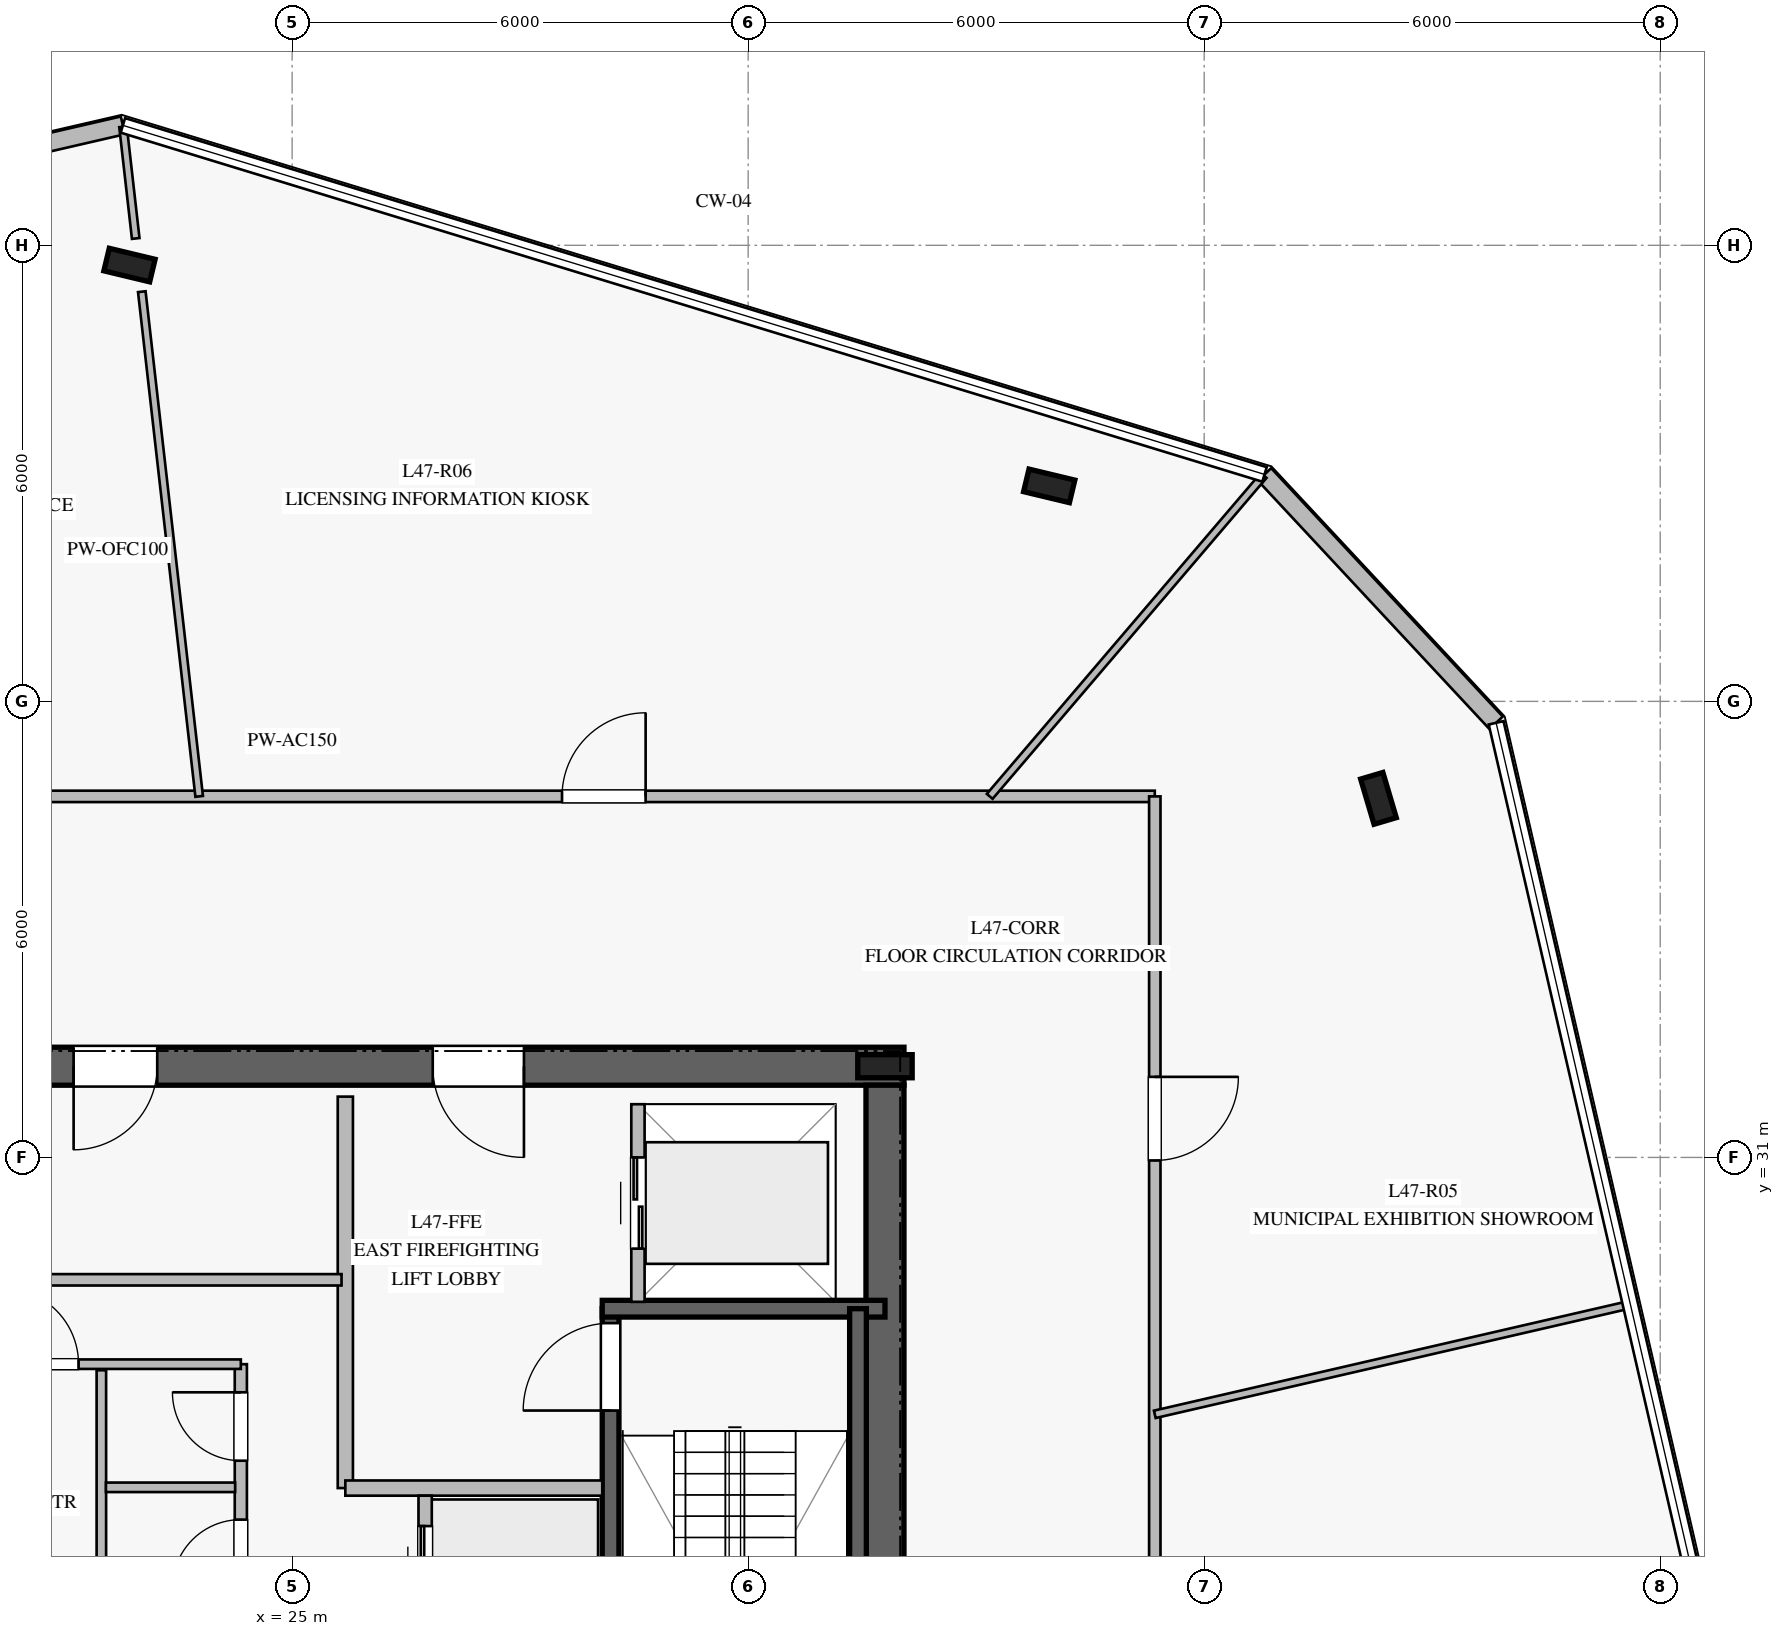
"""IFC4 building model, lengths in metres.
Left out: names, types, materials, properties, quantities, classifications, styles, units other than length and angle.
Written with IfcOpenShell. Run it as: python <this file> out.ifc"""

import sys

from ifc_helpers import new_model, si_unit, direction, frame, frame_2d, origin, origin_2d, place, context, subcontext, project, spatial, rectangle, i_section, extrude, element, fill, save


model = new_model("IFC4")
c1 = context("Model", 3, precision=1e-05, world=origin(), true_north=direction((0.0, 1.0)))
c2 = subcontext(c1, "Body", "Model", "MODEL_VIEW")
j1 = project(units=[si_unit("LENGTHUNIT", "METRE"), si_unit("PLANEANGLEUNIT", "RADIAN")], contexts=[c1])
p1 = place(None, origin())
s1 = spatial("IfcSite", under=j1, at=p1, CompositionType="ELEMENT")
p2 = place(p1, origin())
s2 = spatial("IfcBuilding", under=s1, at=p2, CompositionType="ELEMENT")
p3 = place(p2, frame((0.0, 0.0, 196.8)))
s3 = spatial("IfcBuildingStorey", under=s2, at=p3, CompositionType="ELEMENT", Elevation=196.8)
p4 = place(p3, frame((33.05, 32.2, 0.0), z_axis=(0.0, 0.0, 1.0), x_axis=(-1.0, 0.0, 0.0)))
e1 = element("IfcWall", 1, at=p4, inside=s3, PredefinedType="SHEAR", context=c2, shape_type="SweptSolid", body=[
    extrude(rectangle(XDim=16.1, YDim=0.5, at=frame_2d((8.05, 0.0))), origin(), (0.0, 0.0, 1.0), 3.78),
])
p5 = place(p4, frame((5.0, 0.0, 0.0)))
e2 = element("IfcOpeningElement", 2, at=p5, cuts=e1, PredefinedType="OPENING", context=c2, shape_type="SweptSolid", body=[
    extrude(rectangle(XDim=1.2, YDim=2.25, at=frame_2d((0.6, 1.125))), frame((0.0, 0.26, 0.0), z_axis=(0.0, -1.0, 0.0), x_axis=(1.0, 0.0, 0.0)), (0.0, 0.0, 1.0), 0.52),
])
p6 = place(p4, frame((9.825, 0.0, 0.0)))
e3 = element("IfcOpeningElement", 3, at=p6, cuts=e1, PredefinedType="OPENING", context=c2, shape_type="SweptSolid", body=[
    extrude(rectangle(XDim=1.1, YDim=2.2, at=frame_2d((0.55, 1.1))), frame((0.0, 0.26, 0.0), z_axis=(0.0, -1.0, 0.0), x_axis=(1.0, 0.0, 0.0)), (0.0, 0.0, 1.0), 0.52),
])
p7 = place(p3, frame((32.8, 18.05, 0.0), z_axis=(0.0, 0.0, 1.0), x_axis=(0.0, 1.0, 0.0)))
e4 = element("IfcWall", 4, at=p7, inside=s3, PredefinedType="SHEAR", context=c2, shape_type="SweptSolid", body=[
    extrude(rectangle(XDim=13.9, YDim=0.5, at=frame_2d((6.95, 0.0))), origin(), (0.0, 0.0, 1.0), 3.78),
])
p8 = place(p3, frame((32.8, 32.2, 0.0), z_axis=(0.0, 0.0, 1.0), x_axis=(1.0, 0.0, 0.0)))
e5 = element("IfcColumn", 5, at=p8, inside=s3, PredefinedType="COLUMN", context=c2, shape_type="SweptSolid", body=[
    extrude(i_section(OverallWidth=0.304, OverallDepth=0.716, WebThickness=0.021, FlangeThickness=0.04, at=origin_2d()), origin(), (0.0, 0.0, 1.0), 4.0),
])
p9 = place(p3, frame((29.19, 21.79, 0.0), z_axis=(0.0, 0.0, 1.0), x_axis=(0.0, 1.0, 0.0)))
e6 = element("IfcWall", 6, at=p9, inside=s3, PredefinedType="SOLIDWALL", context=c2, shape_type="SweptSolid", body=[
    extrude(rectangle(XDim=7.22, YDim=0.22, at=frame_2d((3.61, 0.0))), origin(), (0.0, 0.0, 1.0), 3.78),
])
p10 = place(p9, frame((5.88, 0.0, 0.0)))
e7 = element("IfcOpeningElement", 7, at=p10, cuts=e6, PredefinedType="OPENING", context=c2, shape_type="SweptSolid", body=[
    extrude(rectangle(XDim=1.15, YDim=2.2, at=frame_2d((0.575, 1.1))), frame((0.0, 0.12, 0.0), z_axis=(0.0, -1.0, 0.0), x_axis=(1.0, 0.0, 0.0)), (0.0, 0.0, 1.0), 0.24),
])
p11 = place(p3, frame((29.08, 29.01, 0.0), z_axis=(0.0, 0.0, 1.0), x_axis=(1.0, 0.0, 0.0)))
e8 = element("IfcWall", 8, at=p11, inside=s3, PredefinedType="SOLIDWALL", context=c2, shape_type="SweptSolid", body=[
    extrude(rectangle(XDim=3.72, YDim=0.22, at=frame_2d((1.86, 0.0))), origin(), (0.0, 0.0, 1.0), 3.78),
])
p12 = place(p3, frame((32.445, 29.01, 0.0), z_axis=(0.0, 0.0, 1.0), x_axis=(0.0, -1.0, 0.0)))
e9 = element("IfcWall", 9, at=p12, inside=s3, PredefinedType="SOLIDWALL", context=c2, shape_type="SweptSolid", body=[
    extrude(rectangle(XDim=7.22, YDim=0.22, at=frame_2d((3.61, 0.0))), origin(), (0.0, 0.0, 1.0), 3.78),
])
for number, where, z_axis, x_axis in (
    (10, (34.961, 39.835, 0.0), (0.0, 0.0, 1.0), (-0.972, 0.233, 0.0)),
    (11, (22.86, 42.74, 0.0), (0.0, 0.0, 1.0), (-0.972, 0.233, 0.0)),
    (12, (39.293, 35.724, 0.0), (0.0, 0.0, 1.0), (-0.284, 0.959, 0.0)),
):
    element("IfcColumn", number, at=place(p3, frame(where, z_axis=z_axis, x_axis=x_axis)), inside=s3, PredefinedType="COLUMN", context=c2, shape_type="SweptSolid", body=[
        extrude(i_section(OverallWidth=0.305, OverallDepth=0.62, WebThickness=0.021, FlangeThickness=0.04, at=origin_2d()), origin(), (0.0, 0.0, 1.0), 4.0),
    ])
p13 = place(p3, frame((22.773, 44.578, 0.0), z_axis=(0.0, 0.0, 1.0), x_axis=(-0.974385670371, -0.224883448427, 0.0)))
e13 = element("IfcWall", 13, at=p13, inside=s3, PredefinedType="STANDARD", context=c2, shape_type="SweptSolid", body=[
    extrude(rectangle(XDim=4.469, YDim=0.24, at=frame_2d((2.234, 0.0))), origin(), (0.0, 0.0, 1.0), 3.78),
])
p14 = place(p3, frame((40.841, 36.718, 0.0), z_axis=(0.0, 0.0, 1.0), x_axis=(-0.681950226265, 0.73139858415, 0.0)))
e14 = element("IfcWall", 14, at=p14, inside=s3, PredefinedType="STANDARD", context=c2, shape_type="SweptSolid", body=[
    extrude(rectangle(XDim=4.468, YDim=0.24, at=frame_2d((2.234, 0.0))), origin(), (0.0, 0.0, 1.0), 3.78),
])
p15 = place(p3, frame((25.7, 26.65, 0.0), z_axis=(0.0, 0.0, 1.0), x_axis=(0.0, 1.0, 0.0)))
e15 = element("IfcWall", 15, at=p15, inside=s3, PredefinedType="PARTITIONING", context=c2, shape_type="SweptSolid", body=[
    extrude(rectangle(XDim=5.15, YDim=0.2, at=frame_2d((2.575, 0.0))), origin(), (0.0, 0.0, 1.0), 3.78),
])
p16 = place(p3, frame((25.7, 26.65, 0.0), z_axis=(0.0, 0.0, 1.0), x_axis=(1.0, 0.0, 0.0)))
e16 = element("IfcWall", 16, at=p16, inside=s3, PredefinedType="PARTITIONING", context=c2, shape_type="SweptSolid", body=[
    extrude(rectangle(XDim=3.38, YDim=0.2, at=frame_2d((1.69, 0.0))), origin(), (0.0, 0.0, 1.0), 3.78),
])
p17 = place(p3, frame((24.325, 23.35, 0.0), z_axis=(0.0, 0.0, 1.0), x_axis=(0.0, 1.0, 0.0)))
e17 = element("IfcWall", 17, at=p17, inside=s3, PredefinedType="PLUMBINGWALL", context=c2, shape_type="SweptSolid", body=[
    extrude(rectangle(XDim=4.93, YDim=0.16, at=frame_2d((2.465, 0.0))), origin(), (0.0, 0.0, 1.0), 3.78),
])
p18 = place(p17, frame((0.325, 0.0, 0.0)))
e18 = element("IfcOpeningElement", 18, at=p18, cuts=e17, PredefinedType="OPENING", context=c2, shape_type="SweptSolid", body=[
    extrude(rectangle(XDim=0.95, YDim=2.1, at=frame_2d((0.475, 1.05))), frame((0.0, 0.09, 0.0), z_axis=(0.0, -1.0, 0.0), x_axis=(1.0, 0.0, 0.0)), (0.0, 0.0, 1.0), 0.18),
])
p19 = place(p17, frame((1.985, 0.0, 0.0)))
e19 = element("IfcOpeningElement", 19, at=p19, cuts=e17, PredefinedType="OPENING", context=c2, shape_type="SweptSolid", body=[
    extrude(rectangle(XDim=0.9, YDim=2.1, at=frame_2d((0.45, 1.05))), frame((0.0, 0.09, 0.0), z_axis=(0.0, -1.0, 0.0), x_axis=(1.0, 0.0, 0.0)), (0.0, 0.0, 1.0), 0.18),
])
p20 = place(p17, frame((3.66, 0.0, 0.0)))
e20 = element("IfcOpeningElement", 20, at=p20, cuts=e17, PredefinedType="OPENING", context=c2, shape_type="SweptSolid", body=[
    extrude(rectangle(XDim=0.9, YDim=2.1, at=frame_2d((0.45, 1.05))), frame((0.0, 0.09, 0.0), z_axis=(0.0, -1.0, 0.0), x_axis=(1.0, 0.0, 0.0)), (0.0, 0.0, 1.0), 0.18),
])
p21 = place(p3, frame((20.92, 28.28, 0.0), z_axis=(0.0, 0.0, 1.0), x_axis=(1.0, 0.0, 0.0)))
e21 = element("IfcWall", 21, at=p21, inside=s3, PredefinedType="PARTITIONING", context=c2, shape_type="SweptSolid", body=[
    extrude(rectangle(XDim=3.405, YDim=0.125, at=frame_2d((1.703, 0.0))), origin(), (0.0, 0.0, 1.0), 3.78),
])
p22 = place(p21, frame((0.27, 0.0, 0.0)))
e22 = element("IfcOpeningElement", 22, at=p22, cuts=e21, PredefinedType="OPENING", context=c2, shape_type="SweptSolid", body=[
    extrude(rectangle(XDim=1.0, YDim=2.15, at=frame_2d((0.5, 1.075))), frame((0.0, 0.073, 0.0), z_axis=(0.0, -1.0, 0.0), x_axis=(1.0, 0.0, 0.0)), (0.0, 0.0, 1.0), 0.145),
])
p23 = place(p3, frame((22.49, 24.97, 0.0), z_axis=(0.0, 0.0, 1.0), x_axis=(0.0, 1.0, 0.0)))
e23 = element("IfcWall", 23, at=p23, inside=s3, PredefinedType="PARTITIONING", context=c2, shape_type="SweptSolid", body=[
    extrude(rectangle(XDim=3.23, YDim=0.125, at=frame_2d((1.615, 0.0))), origin(), (0.0, 0.0, 1.0), 3.78),
])
p24 = place(p3, frame((22.55, 26.66, 0.0), z_axis=(0.0, 0.0, 1.0), x_axis=(1.0, 0.0, 0.0)))
e24 = element("IfcWall", 24, at=p24, inside=s3, PredefinedType="PARTITIONING", context=c2, shape_type="SweptSolid", body=[
    extrude(rectangle(XDim=1.7, YDim=0.125, at=frame_2d((0.85, 0.0))), origin(), (0.0, 0.0, 1.0), 3.78),
])
p25 = place(p3, frame((19.75, 29.39, 0.0), z_axis=(0.0, 0.0, 1.0), x_axis=(1.0, 0.0, 0.0)))
e25 = element("IfcWall", 25, at=p25, inside=s3, PredefinedType="PARTITIONING", context=c2, shape_type="SweptSolid", body=[
    extrude(rectangle(XDim=5.9, YDim=0.15, at=frame_2d((2.95, 0.0))), origin(), (0.0, 0.0, 1.0), 3.78),
])
p26 = place(p3, frame((26.75, 24.65, 0.0), z_axis=(0.0, 0.0, 1.0), x_axis=(0.0, 1.0, 0.0)))
e26 = element("IfcWall", 26, at=p26, inside=s3, PredefinedType="PARTITIONING", context=c2, shape_type="SweptSolid", body=[
    extrude(rectangle(XDim=1.9, YDim=0.175, at=frame_2d((0.95, 0.0))), origin(), (0.0, 0.0, 1.0), 3.78),
])
p27 = place(p26, frame((0.4, 0.0, 0.0)))
e27 = element("IfcOpeningElement", 27, at=p27, cuts=e26, PredefinedType="OPENING", context=c2, shape_type="SweptSolid", body=[
    extrude(rectangle(XDim=1.1, YDim=2.2, at=frame_2d((0.55, 1.1))), frame((0.0, 0.098, 0.0), z_axis=(0.0, -1.0, 0.0), x_axis=(1.0, 0.0, 0.0)), (0.0, 0.0, 1.0), 0.195),
])
p28 = place(p3, frame((29.55, 29.1, 0.0), z_axis=(0.0, 0.0, 1.0), x_axis=(0.0, 1.0, 0.0)))
e28 = element("IfcWall", 28, at=p28, inside=s3, PredefinedType="PARTITIONING", context=c2, shape_type="SweptSolid", body=[
    extrude(rectangle(XDim=2.6, YDim=0.175, at=frame_2d((1.3, 0.0))), origin(), (0.0, 0.0, 1.0), 3.78),
])
p29 = place(p28, frame((0.7, 0.0, 0.0)))
e29 = element("IfcOpeningElement", 29, at=p29, cuts=e28, PredefinedType="OPENING", context=c2, shape_type="SweptSolid", body=[
    extrude(rectangle(XDim=1.2, YDim=2.2, at=frame_2d((0.6, 1.1))), frame((0.0, 0.098, 0.0), z_axis=(0.0, -1.0, 0.0), x_axis=(1.0, 0.0, 0.0)), (0.0, 0.0, 1.0), 0.195),
])
p30 = place(p3, frame((13.65, 35.75, 0.0), z_axis=(0.0, 0.0, 1.0), x_axis=(1.0, 0.0, 0.0)))
e30 = element("IfcWall", 30, at=p30, inside=s3, PredefinedType="PARTITIONING", context=c2, shape_type="SweptSolid", body=[
    extrude(rectangle(XDim=22.7, YDim=0.15, at=frame_2d((11.35, 0.0))), origin(), (0.0, 0.0, 1.0), 3.02),
])
p31 = place(p30, frame((14.901, 0.0, 0.0)))
e31 = element("IfcOpeningElement", 31, at=p31, cuts=e30, PredefinedType="OPENING", context=c2, shape_type="SweptSolid", body=[
    extrude(rectangle(XDim=1.1, YDim=2.2, at=frame_2d((0.55, 1.1))), frame((0.0, 0.085, 0.0), z_axis=(0.0, -1.0, 0.0), x_axis=(1.0, 0.0, 0.0)), (0.0, 0.0, 1.0), 0.17),
])
p32 = place(p30, frame((4.604, 0.0, 0.0)))
e32 = element("IfcOpeningElement", 32, at=p32, cuts=e30, PredefinedType="OPENING", context=c2, shape_type="SweptSolid", body=[
    extrude(rectangle(XDim=1.1, YDim=2.2, at=frame_2d((0.55, 1.1))), frame((0.0, 0.085, 0.0), z_axis=(0.0, -1.0, 0.0), x_axis=(1.0, 0.0, 0.0)), (0.0, 0.0, 1.0), 0.17),
])
p33 = place(p3, frame((36.35, 35.75, 0.0), z_axis=(0.0, 0.0, 1.0), x_axis=(0.0, -1.0, 0.0)))
e33 = element("IfcWall", 33, at=p33, inside=s3, PredefinedType="PARTITIONING", context=c2, shape_type="SweptSolid", body=[
    extrude(rectangle(XDim=21.5, YDim=0.15, at=frame_2d((10.75, 0.0))), origin(), (0.0, 0.0, 1.0), 3.05),
])
p34 = place(p33, frame((13.985, 0.0, 0.0)))
e34 = element("IfcOpeningElement", 34, at=p34, cuts=e33, PredefinedType="OPENING", context=c2, shape_type="SweptSolid", body=[
    extrude(rectangle(XDim=1.1, YDim=2.2, at=frame_2d((0.55, 1.1))), frame((0.0, 0.085, 0.0), z_axis=(0.0, -1.0, 0.0), x_axis=(1.0, 0.0, 0.0)), (0.0, 0.0, 1.0), 0.17),
])
p35 = place(p33, frame((3.69, 0.0, 0.0)))
e35 = element("IfcOpeningElement", 35, at=p35, cuts=e33, PredefinedType="OPENING", context=c2, shape_type="SweptSolid", body=[
    extrude(rectangle(XDim=1.1, YDim=2.2, at=frame_2d((0.55, 1.1))), frame((0.0, 0.085, 0.0), z_axis=(0.0, -1.0, 0.0), x_axis=(1.0, 0.0, 0.0)), (0.0, 0.0, 1.0), 0.17),
])
p36 = place(p3, frame((23.777, 35.75, 0.0), z_axis=(0.0, 0.0, 1.0), x_axis=(-0.112997397255, 0.993595283913, 0.0)))
e36 = element("IfcWall", 36, at=p36, inside=s3, PredefinedType="MOVABLE", context=c2, shape_type="SweptSolid", body=[
    extrude(rectangle(XDim=6.683, YDim=0.1, at=frame_2d((3.341, 0.0))), origin(), (0.0, 0.0, 1.0), 3.02),
])
p37 = place(p3, frame((22.942, 43.09, 0.0), z_axis=(0.0, 0.0, 1.0), x_axis=(-0.112876363415, 0.993609041113, 0.0)))
e37 = element("IfcWall", 37, at=p37, inside=s3, PredefinedType="MOVABLE", context=c2, shape_type="SweptSolid", body=[
    extrude(rectangle(XDim=1.479, YDim=0.1, at=frame_2d((0.74, 0.0))), origin(), (0.0, 0.0, 1.0), 3.78),
])
p38 = place(p3, frame((36.35, 27.62, 0.0), z_axis=(0.0, 0.0, 1.0), x_axis=(0.974375135349, 0.224929090188, 0.0)))
e38 = element("IfcWall", 38, at=p38, inside=s3, PredefinedType="MOVABLE", context=c2, shape_type="SweptSolid", body=[
    extrude(rectangle(XDim=6.406, YDim=0.1, at=frame_2d((3.203, 0.0))), origin(), (0.0, 0.0, 1.0), 3.18),
])
p39 = place(p3, frame((34.178, 35.75, 0.0), z_axis=(0.0, 0.0, 1.0), x_axis=(0.649254313093, 0.760571388451, 0.0)))
e39 = element("IfcWall", 39, at=p39, inside=s3, PredefinedType="MOVABLE", context=c2, shape_type="SweptSolid", body=[
    extrude(rectangle(XDim=5.551, YDim=0.1, at=frame_2d((2.775, 0.0))), origin(), (0.0, 0.0, 1.0), 3.18),
])
p40 = place(p10, origin())
e40 = element("IfcDoor", 40, at=p40, inside=s3, OperationType="SINGLE_SWING_LEFT", PredefinedType="DOOR", context=c2, shape_type="SweptSolid", body=[
    extrude(rectangle(XDim=1.15, YDim=2.2, at=frame_2d((0.575, 1.1))), frame((0.0, 0.025, 0.0), z_axis=(0.0, -1.0, 0.0), x_axis=(1.0, 0.0, 0.0)), (0.0, 0.0, 1.0), 0.05),
])
fill(e7, e40)
p41 = place(p5, origin())
e41 = element("IfcDoor", 41, at=p41, inside=s3, OperationType="SINGLE_SWING_LEFT", PredefinedType="DOOR", context=c2, shape_type="SweptSolid", body=[
    extrude(rectangle(XDim=1.2, YDim=2.25, at=frame_2d((0.6, 1.125))), frame((0.0, 0.025, 0.0), z_axis=(0.0, -1.0, 0.0), x_axis=(1.0, 0.0, 0.0)), (0.0, 0.0, 1.0), 0.05),
])
fill(e2, e41)
p42 = place(p19, origin())
e42 = element("IfcDoor", 42, at=p42, inside=s3, OperationType="SINGLE_SWING_LEFT", PredefinedType="DOOR", context=c2, shape_type="SweptSolid", body=[
    extrude(rectangle(XDim=0.9, YDim=2.1, at=frame_2d((0.45, 1.05))), frame((0.0, 0.025, 0.0), z_axis=(0.0, -1.0, 0.0), x_axis=(1.0, 0.0, 0.0)), (0.0, 0.0, 1.0), 0.05),
])
fill(e19, e42)
p43 = place(p20, origin())
e43 = element("IfcDoor", 43, at=p43, inside=s3, OperationType="SINGLE_SWING_RIGHT", PredefinedType="DOOR", context=c2, shape_type="SweptSolid", body=[
    extrude(rectangle(XDim=0.9, YDim=2.1, at=frame_2d((0.45, 1.05))), frame((0.0, 0.025, 0.0), z_axis=(0.0, -1.0, 0.0), x_axis=(1.0, 0.0, 0.0)), (0.0, 0.0, 1.0), 0.05),
])
fill(e20, e43)
p44 = place(p22, origin())
e44 = element("IfcDoor", 44, at=p44, inside=s3, OperationType="SINGLE_SWING_LEFT", PredefinedType="DOOR", context=c2, shape_type="SweptSolid", body=[
    extrude(rectangle(XDim=1.0, YDim=2.15, at=frame_2d((0.5, 1.075))), frame((0.0, 0.025, 0.0), z_axis=(0.0, -1.0, 0.0), x_axis=(1.0, 0.0, 0.0)), (0.0, 0.0, 1.0), 0.05),
])
fill(e22, e44)
p45 = place(p6, origin())
e45 = element("IfcDoor", 45, at=p45, inside=s3, OperationType="SINGLE_SWING_RIGHT", PredefinedType="DOOR", context=c2, shape_type="SweptSolid", body=[
    extrude(rectangle(XDim=1.1, YDim=2.2, at=frame_2d((0.55, 1.1))), frame((0.0, 0.025, 0.0), z_axis=(0.0, -1.0, 0.0), x_axis=(1.0, 0.0, 0.0)), (0.0, 0.0, 1.0), 0.05),
])
fill(e3, e45)
p46 = place(p27, origin())
e46 = element("IfcDoor", 46, at=p46, inside=s3, OperationType="DOUBLE_DOOR_SLIDING", PredefinedType="DOOR", context=c2, shape_type="SweptSolid", body=[
    extrude(rectangle(XDim=1.1, YDim=2.2, at=frame_2d((0.55, 1.1))), frame((0.0, 0.025, 0.0), z_axis=(0.0, -1.0, 0.0), x_axis=(1.0, 0.0, 0.0)), (0.0, 0.0, 1.0), 0.05),
])
fill(e27, e46)
p47 = place(p29, origin())
e47 = element("IfcDoor", 47, at=p47, inside=s3, OperationType="DOUBLE_DOOR_SLIDING", PredefinedType="DOOR", context=c2, shape_type="SweptSolid", body=[
    extrude(rectangle(XDim=1.2, YDim=2.2, at=frame_2d((0.6, 1.1))), frame((0.0, 0.025, 0.0), z_axis=(0.0, -1.0, 0.0), x_axis=(1.0, 0.0, 0.0)), (0.0, 0.0, 1.0), 0.05),
])
fill(e29, e47)
p48 = place(p35, origin())
e48 = element("IfcDoor", 48, at=p48, inside=s3, OperationType="SINGLE_SWING_LEFT", PredefinedType="DOOR", context=c2, shape_type="SweptSolid", body=[
    extrude(rectangle(XDim=1.1, YDim=2.2, at=frame_2d((0.55, 1.1))), frame((0.0, 0.025, 0.0), z_axis=(0.0, -1.0, 0.0), x_axis=(1.0, 0.0, 0.0)), (0.0, 0.0, 1.0), 0.05),
])
fill(e35, e48)
p49 = place(p31, origin())
e49 = element("IfcDoor", 49, at=p49, inside=s3, OperationType="SINGLE_SWING_RIGHT", PredefinedType="DOOR", context=c2, shape_type="SweptSolid", body=[
    extrude(rectangle(XDim=1.1, YDim=2.2, at=frame_2d((0.55, 1.1))), frame((0.0, 0.025, 0.0), z_axis=(0.0, -1.0, 0.0), x_axis=(1.0, 0.0, 0.0)), (0.0, 0.0, 1.0), 0.05),
])
fill(e31, e49)
save(model, sys.argv[1])
